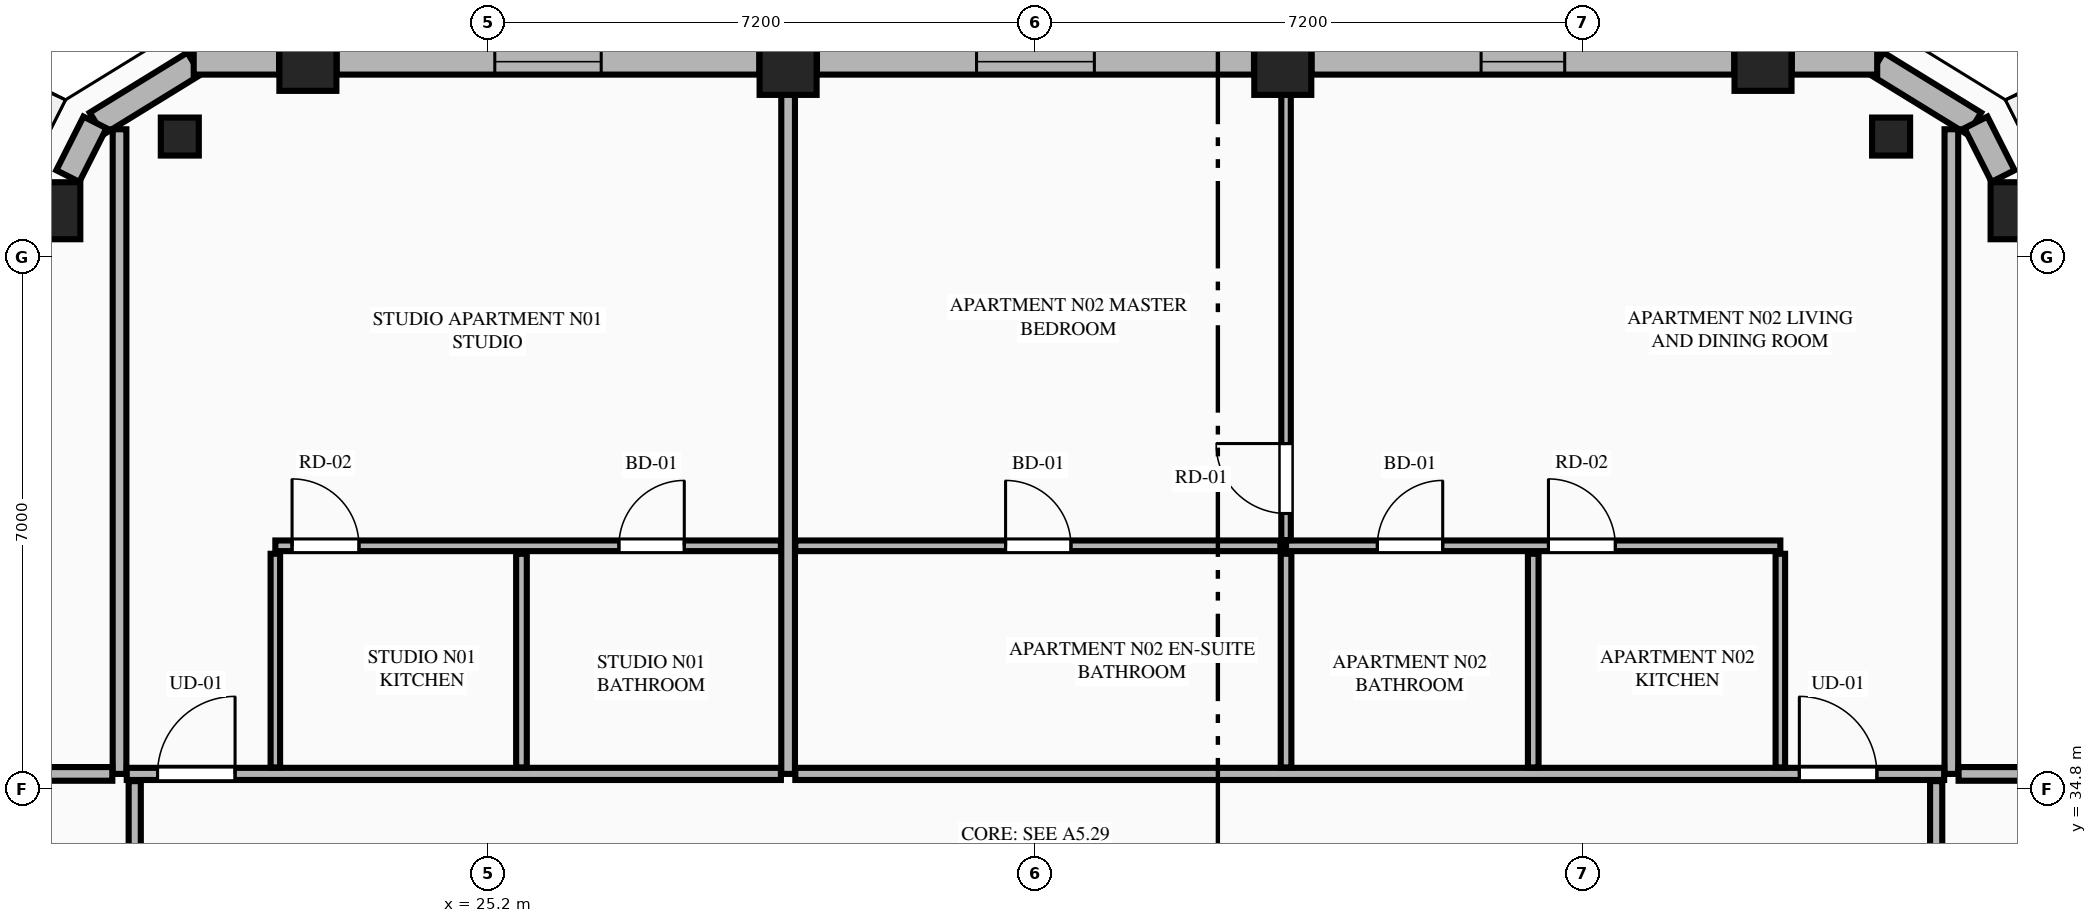
"""IFC4 building model, lengths in metres.
Left out: names, types, materials, properties, quantities, classifications, styles, units other than length and angle.
Written with IfcOpenShell. Run it as: python <this file> out.ifc"""

import sys

from ifc_helpers import new_model, si_unit, direction, frame, frame_2d, origin, origin_2d, place, context, subcontext, project, spatial, rectangle, extrude, element, fill, save


model = new_model("IFC4")
c1 = context("Model", 3, precision=1e-05, world=origin(), true_north=direction((0.0, 1.0)))
c2 = subcontext(c1, "Body", "Model", "MODEL_VIEW")
j1 = project(units=[si_unit("LENGTHUNIT", "METRE"), si_unit("PLANEANGLEUNIT", "RADIAN")], contexts=[c1])
p1 = place(None, origin())
s1 = spatial("IfcSite", under=j1, at=p1, CompositionType="ELEMENT")
p2 = place(p1, origin())
s2 = spatial("IfcBuilding", under=s1, at=p2, CompositionType="ELEMENT")
p3 = place(p2, frame((0.0, 0.0, 237.95)))
s3 = spatial("IfcBuildingStorey", under=s2, at=p3, CompositionType="ELEMENT", Elevation=237.95)
for number, where, z_axis, x_axis in (
    (1, (45.341, 42.409, 0.0), (0.0, 0.0, 1.0), (1.0, 0.0, 0.0)),
    (2, (41.972, 44.361, 0.0), (0.0, 0.0, 1.0), (1.0, 0.0, 0.0)),
    (3, (35.654, 44.308, 0.0), (0.0, 0.0, 1.0), (1.0, 0.0, 0.0)),
    (4, (29.146, 44.308, 0.0), (0.0, 0.0, 1.0), (1.0, 0.0, 0.0)),
    (5, (22.828, 44.361, 0.0), (0.0, 0.0, 1.0), (1.0, 0.0, 0.0)),
    (6, (19.459, 42.409, 0.0), (0.0, 0.0, 1.0), (1.0, 0.0, 0.0)),
):
    element("IfcColumn", number, at=place(p3, frame(where, z_axis=z_axis, x_axis=x_axis)), inside=s3, PredefinedType="COLUMN", context=c2, shape_type="SweptSolid", body=[
        extrude(rectangle(XDim=0.75, YDim=0.75, at=origin_2d()), origin(), (0.0, 0.0, 1.0), 3.65),
    ])
for number, where, z_axis, x_axis in (
    (7, (43.657, 43.385, 0.0), (0.0, 0.0, 1.0), (-0.865, 0.501, 0.0)),
    (8, (21.143, 43.385, 0.0), (0.0, 0.0, 1.0), (-0.865, -0.501, 0.0)),
):
    element("IfcColumn", number, at=place(p3, frame(where, z_axis=z_axis, x_axis=x_axis)), inside=s3, PredefinedType="PILASTER", context=c2, shape_type="SweptSolid", body=[
        extrude(rectangle(XDim=0.5, YDim=0.35, at=origin_2d()), origin(), (0.0, 0.0, 1.0), 3.65),
    ])
for number, where, z_axis, x_axis in (
    (9, (44.753, 43.555, 0.0), (0.0, 0.0, 1.0), (-0.852, 0.524, 0.0)),
    (10, (21.331, 44.345, 0.0), (0.0, 0.0, 1.0), (-0.852, -0.524, 0.0)),
):
    element("IfcWall", number, at=place(p3, frame(where, z_axis=z_axis, x_axis=x_axis)), inside=s3, PredefinedType="STANDARD", context=c2, shape_type="SweptSolid", body=[
        extrude(rectangle(XDim=1.508, YDim=0.34, at=frame_2d((0.754, 0.0))), origin(), (0.0, 0.0, 1.0), 3.45),
    ])
p4 = place(p3, frame((45.13, 42.865, 0.0), z_axis=(0.0, 0.0, 1.0), x_axis=(-0.451159191899, 0.892443490404, 0.0)))
e11 = element("IfcWall", 11, at=p4, inside=s3, PredefinedType="STANDARD", context=c2, shape_type="SweptSolid", body=[
    extrude(rectangle(XDim=0.791, YDim=0.34, at=frame_2d((0.396, 0.0))), origin(), (0.0, 0.0, 1.0), 3.45),
])
p5 = place(p3, frame((43.474, 44.37, 0.0), z_axis=(0.0, 0.0, 1.0), x_axis=(-1.0, 0.0, 0.0)))
e12 = element("IfcWall", 12, at=p5, inside=s3, PredefinedType="STANDARD", context=c2, shape_type="SweptSolid", body=[
    extrude(rectangle(XDim=1.123, YDim=0.34, at=frame_2d((0.562, 0.0))), origin(), (0.0, 0.0, 1.0), 3.45),
])
p6 = place(p3, frame((41.593, 44.37, 0.0), z_axis=(0.0, 0.0, 1.0), x_axis=(-1.0, 0.0, 0.0)))
e13 = element("IfcWall", 13, at=p6, inside=s3, PredefinedType="STANDARD", context=c2, shape_type="SweptSolid", body=[
    extrude(rectangle(XDim=5.56, YDim=0.34, at=frame_2d((2.78, 0.0))), origin(), (0.0, 0.0, 1.0), 2.983),
])
p7 = place(p6, frame((2.23, 0.0, 0.75)))
e14 = element("IfcOpeningElement", 14, at=p7, cuts=e13, PredefinedType="OPENING", context=c2, shape_type="SweptSolid", body=[
    extrude(rectangle(XDim=1.1, YDim=2.0, at=frame_2d((0.55, 1.0))), frame((0.0, 0.18, 0.0), z_axis=(0.0, -1.0, 0.0), x_axis=(1.0, 0.0, 0.0)), (0.0, 0.0, 1.0), 0.36),
])
p8 = place(p3, frame((35.275, 44.37, 0.0), z_axis=(0.0, 0.0, 1.0), x_axis=(-1.0, 0.0, 0.0)))
e15 = element("IfcWall", 15, at=p8, inside=s3, PredefinedType="STANDARD", context=c2, shape_type="SweptSolid", body=[
    extrude(rectangle(XDim=5.75, YDim=0.34, at=frame_2d((2.875, 0.0))), origin(), (0.0, 0.0, 1.0), 2.983),
])
p9 = place(p8, frame((2.1, 0.0, 0.75)))
e16 = element("IfcOpeningElement", 16, at=p9, cuts=e15, PredefinedType="OPENING", context=c2, shape_type="SweptSolid", body=[
    extrude(rectangle(XDim=1.55, YDim=2.05, at=frame_2d((0.775, 1.025))), frame((0.0, 0.18, 0.0), z_axis=(0.0, -1.0, 0.0), x_axis=(1.0, 0.0, 0.0)), (0.0, 0.0, 1.0), 0.36),
])
p10 = place(p3, frame((28.767, 44.37, 0.0), z_axis=(0.0, 0.0, 1.0), x_axis=(-1.0, 0.0, 0.0)))
e17 = element("IfcWall", 17, at=p10, inside=s3, PredefinedType="STANDARD", context=c2, shape_type="SweptSolid", body=[
    extrude(rectangle(XDim=5.56, YDim=0.34, at=frame_2d((2.78, 0.0))), origin(), (0.0, 0.0, 1.0), 2.983),
])
p11 = place(p10, frame((2.08, 0.0, 0.75)))
e18 = element("IfcOpeningElement", 18, at=p11, cuts=e17, PredefinedType="OPENING", context=c2, shape_type="SweptSolid", body=[
    extrude(rectangle(XDim=1.4, YDim=2.05, at=frame_2d((0.7, 1.025))), frame((0.0, 0.18, 0.0), z_axis=(0.0, -1.0, 0.0), x_axis=(1.0, 0.0, 0.0)), (0.0, 0.0, 1.0), 0.36),
])
p12 = place(p3, frame((22.449, 44.37, 0.0), z_axis=(0.0, 0.0, 1.0), x_axis=(-1.0, 0.0, 0.0)))
e19 = element("IfcWall", 19, at=p12, inside=s3, PredefinedType="STANDARD", context=c2, shape_type="SweptSolid", body=[
    extrude(rectangle(XDim=1.123, YDim=0.34, at=frame_2d((0.562, 0.0))), origin(), (0.0, 0.0, 1.0), 3.45),
])
p13 = place(p3, frame((20.027, 43.571, 0.0), z_axis=(0.0, 0.0, 1.0), x_axis=(-0.451404919072, -0.89231922485, 0.0)))
e20 = element("IfcWall", 20, at=p13, inside=s3, PredefinedType="STANDARD", context=c2, shape_type="SweptSolid", body=[
    extrude(rectangle(XDim=0.791, YDim=0.34, at=frame_2d((0.396, 0.0))), origin(), (0.0, 0.0, 1.0), 3.45),
])
p14 = place(p3, frame((20.35, 35.0, 0.0), z_axis=(0.0, 0.0, 1.0), x_axis=(0.0, 1.0, 0.0)))
e21 = element("IfcWall", 21, at=p14, inside=s3, PredefinedType="PARTITIONING", context=c2, shape_type="SweptSolid", body=[
    extrude(rectangle(XDim=8.481, YDim=0.18, at=frame_2d((4.24, 0.0))), origin(), (0.0, 0.0, 1.0), 3.45),
])
p15 = place(p3, frame((29.146, 35.0, 0.0), z_axis=(0.0, 0.0, 1.0), x_axis=(0.0, 1.0, 0.0)))
e22 = element("IfcWall", 22, at=p15, inside=s3, PredefinedType="PARTITIONING", context=c2, shape_type="SweptSolid", body=[
    extrude(rectangle(XDim=9.195, YDim=0.18, at=frame_2d((4.598, 0.0))), origin(), (0.0, 0.0, 1.0), 2.907),
])
p16 = place(p3, frame((44.45, 35.0, 0.0), z_axis=(0.0, 0.0, 1.0), x_axis=(0.0, 1.0, 0.0)))
e23 = element("IfcWall", 23, at=p16, inside=s3, PredefinedType="PARTITIONING", context=c2, shape_type="SweptSolid", body=[
    extrude(rectangle(XDim=8.481, YDim=0.18, at=frame_2d((4.24, 0.0))), origin(), (0.0, 0.0, 1.0), 3.45),
])
p17 = place(p3, frame((20.445, 35.0, 0.0), z_axis=(0.0, 0.0, 1.0), x_axis=(1.0, 0.0, 0.0)))
e24 = element("IfcWall", 24, at=p17, inside=s3, PredefinedType="PARTITIONING", context=c2, shape_type="SweptSolid", body=[
    extrude(rectangle(XDim=8.606, YDim=0.16, at=frame_2d((4.303, 0.0))), origin(), (0.0, 0.0, 1.0), 3.45),
])
p18 = place(p17, frame((0.405, 0.0, 0.0)))
e25 = element("IfcOpeningElement", 25, at=p18, cuts=e24, PredefinedType="OPENING", context=c2, shape_type="SweptSolid", body=[
    extrude(rectangle(XDim=1.02, YDim=2.25, at=frame_2d((0.51, 1.125))), frame((0.0, 0.09, 0.0), z_axis=(0.0, -1.0, 0.0), x_axis=(1.0, 0.0, 0.0)), (0.0, 0.0, 1.0), 0.18),
])
p19 = place(p3, frame((22.4, 35.085, 0.0), z_axis=(0.0, 0.0, 1.0), x_axis=(0.0, 1.0, 0.0)))
e26 = element("IfcWall", 26, at=p19, inside=s3, PredefinedType="PARTITIONING", context=c2, shape_type="SweptSolid", body=[
    extrude(rectangle(XDim=2.811, YDim=0.125, at=frame_2d((1.406, 0.0))), origin(), (0.0, 0.0, 1.0), 3.45),
])
p20 = place(p3, frame((22.4, 38.001, 0.0), z_axis=(0.0, 0.0, 1.0), x_axis=(1.0, 0.0, 0.0)))
e27 = element("IfcWall", 27, at=p20, inside=s3, PredefinedType="PLUMBINGWALL", context=c2, shape_type="SweptSolid", body=[
    extrude(rectangle(XDim=6.651, YDim=0.14, at=frame_2d((3.326, 0.0))), origin(), (0.0, 0.0, 1.0), 3.45),
])
p21 = place(p20, frame((4.52, 0.0, 0.0)))
e28 = element("IfcOpeningElement", 28, at=p21, cuts=e27, PredefinedType="OPENING", context=c2, shape_type="SweptSolid", body=[
    extrude(rectangle(XDim=0.86, YDim=2.1, at=frame_2d((0.43, 1.05))), frame((0.0, 0.08, 0.0), z_axis=(0.0, -1.0, 0.0), x_axis=(1.0, 0.0, 0.0)), (0.0, 0.0, 1.0), 0.16),
])
p22 = place(p20, frame((0.22, 0.0, 0.0)))
e29 = element("IfcOpeningElement", 29, at=p22, cuts=e27, PredefinedType="OPENING", context=c2, shape_type="SweptSolid", body=[
    extrude(rectangle(XDim=0.88, YDim=2.15, at=frame_2d((0.44, 1.075))), frame((0.0, 0.08, 0.0), z_axis=(0.0, -1.0, 0.0), x_axis=(1.0, 0.0, 0.0)), (0.0, 0.0, 1.0), 0.16),
])
p23 = place(p3, frame((25.638, 35.085, 0.0), z_axis=(0.0, 0.0, 1.0), x_axis=(0.0, 1.0, 0.0)))
e30 = element("IfcWall", 30, at=p23, inside=s3, PredefinedType="PLUMBINGWALL", context=c2, shape_type="SweptSolid", body=[
    extrude(rectangle(XDim=2.811, YDim=0.14, at=frame_2d((1.406, 0.0))), origin(), (0.0, 0.0, 1.0), 3.45),
])
p24 = place(p3, frame((29.241, 35.0, 0.0), z_axis=(0.0, 0.0, 1.0), x_axis=(1.0, 0.0, 0.0)))
e31 = element("IfcWall", 31, at=p24, inside=s3, PredefinedType="PARTITIONING", context=c2, shape_type="SweptSolid", body=[
    extrude(rectangle(XDim=15.114, YDim=0.16, at=frame_2d((7.557, 0.0))), origin(), (0.0, 0.0, 1.0), 3.45),
])
p25 = place(p24, frame((13.209, 0.0, 0.0)))
e32 = element("IfcOpeningElement", 32, at=p25, cuts=e31, PredefinedType="OPENING", context=c2, shape_type="SweptSolid", body=[
    extrude(rectangle(XDim=1.02, YDim=2.25, at=frame_2d((0.51, 1.125))), frame((0.0, 0.09, 0.0), z_axis=(0.0, -1.0, 0.0), x_axis=(1.0, 0.0, 0.0)), (0.0, 0.0, 1.0), 0.18),
])
p26 = place(p3, frame((42.2, 35.085, 0.0), z_axis=(0.0, 0.0, 1.0), x_axis=(0.0, 1.0, 0.0)))
e33 = element("IfcWall", 33, at=p26, inside=s3, PredefinedType="PARTITIONING", context=c2, shape_type="SweptSolid", body=[
    extrude(rectangle(XDim=2.811, YDim=0.125, at=frame_2d((1.406, 0.0))), origin(), (0.0, 0.0, 1.0), 3.45),
])
p27 = place(p3, frame((35.697, 38.001, 0.0), z_axis=(0.0, 0.0, 1.0), x_axis=(1.0, 0.0, 0.0)))
e34 = element("IfcWall", 34, at=p27, inside=s3, PredefinedType="PLUMBINGWALL", context=c2, shape_type="SweptSolid", body=[
    extrude(rectangle(XDim=6.503, YDim=0.14, at=frame_2d((3.251, 0.0))), origin(), (0.0, 0.0, 1.0), 3.45),
])
p28 = place(p27, frame((1.201, 0.0, 0.0)))
e35 = element("IfcOpeningElement", 35, at=p28, cuts=e34, PredefinedType="OPENING", context=c2, shape_type="SweptSolid", body=[
    extrude(rectangle(XDim=0.86, YDim=2.1, at=frame_2d((0.43, 1.05))), frame((0.0, 0.08, 0.0), z_axis=(0.0, -1.0, 0.0), x_axis=(1.0, 0.0, 0.0)), (0.0, 0.0, 1.0), 0.16),
])
p29 = place(p27, frame((3.452, 0.0, 0.0)))
e36 = element("IfcOpeningElement", 36, at=p29, cuts=e34, PredefinedType="OPENING", context=c2, shape_type="SweptSolid", body=[
    extrude(rectangle(XDim=0.88, YDim=2.15, at=frame_2d((0.44, 1.075))), frame((0.0, 0.08, 0.0), z_axis=(0.0, -1.0, 0.0), x_axis=(1.0, 0.0, 0.0)), (0.0, 0.0, 1.0), 0.16),
])
p30 = place(p3, frame((29.241, 38.001, 0.0), z_axis=(0.0, 0.0, 1.0), x_axis=(1.0, 0.0, 0.0)))
e37 = element("IfcWall", 37, at=p30, inside=s3, PredefinedType="PLUMBINGWALL", context=c2, shape_type="SweptSolid", body=[
    extrude(rectangle(XDim=6.381, YDim=0.14, at=frame_2d((3.19, 0.0))), origin(), (0.0, 0.0, 1.0), 3.45),
])
p31 = place(p30, frame((2.766, 0.0, 0.0)))
e38 = element("IfcOpeningElement", 38, at=p31, cuts=e37, PredefinedType="OPENING", context=c2, shape_type="SweptSolid", body=[
    extrude(rectangle(XDim=0.86, YDim=2.1, at=frame_2d((0.43, 1.05))), frame((0.0, 0.08, 0.0), z_axis=(0.0, -1.0, 0.0), x_axis=(1.0, 0.0, 0.0)), (0.0, 0.0, 1.0), 0.16),
])
p32 = place(p3, frame((38.949, 35.085, 0.0), z_axis=(0.0, 0.0, 1.0), x_axis=(0.0, 1.0, 0.0)))
e39 = element("IfcWall", 39, at=p32, inside=s3, PredefinedType="PLUMBINGWALL", context=c2, shape_type="SweptSolid", body=[
    extrude(rectangle(XDim=2.811, YDim=0.14, at=frame_2d((1.406, 0.0))), origin(), (0.0, 0.0, 1.0), 3.45),
])
p33 = place(p3, frame((35.697, 35.085, 0.0), z_axis=(0.0, 0.0, 1.0), x_axis=(0.0, 1.0, 0.0)))
e40 = element("IfcWall", 40, at=p33, inside=s3, PredefinedType="PLUMBINGWALL", context=c2, shape_type="SweptSolid", body=[
    extrude(rectangle(XDim=2.811, YDim=0.14, at=frame_2d((1.406, 0.0))), origin(), (0.0, 0.0, 1.0), 2.907),
])
p34 = place(p3, frame((35.697, 38.076, 0.0), z_axis=(0.0, 0.0, 1.0), x_axis=(0.0, 1.0, 0.0)))
e41 = element("IfcWall", 41, at=p34, inside=s3, PredefinedType="PARTITIONING", context=c2, shape_type="SweptSolid", body=[
    extrude(rectangle(XDim=6.209, YDim=0.125, at=frame_2d((3.104, 0.0))), origin(), (0.0, 0.0, 1.0), 2.907),
])
p35 = place(p34, frame((0.35, 0.0, 0.0)))
e42 = element("IfcOpeningElement", 42, at=p35, cuts=e41, PredefinedType="OPENING", context=c2, shape_type="SweptSolid", body=[
    extrude(rectangle(XDim=0.92, YDim=2.15, at=frame_2d((0.46, 1.075))), frame((0.0, 0.073, 0.0), z_axis=(0.0, -1.0, 0.0), x_axis=(1.0, 0.0, 0.0)), (0.0, 0.0, 1.0), 0.145),
])
p36 = place(p3, frame((15.933, 35.0, 0.0), z_axis=(0.0, 0.0, 1.0), x_axis=(1.0, 0.0, 0.0)))
e43 = element("IfcWall", 43, at=p36, inside=s3, PredefinedType="PARTITIONING", context=c2, shape_type="SweptSolid", body=[
    extrude(rectangle(XDim=4.322, YDim=0.18, at=frame_2d((2.161, 0.0))), origin(), (0.0, 0.0, 1.0), 3.45),
])
p37 = place(p3, frame((44.545, 35.0, 0.0), z_axis=(0.0, 0.0, 1.0), x_axis=(1.0, 0.0, 0.0)))
e44 = element("IfcWall", 44, at=p37, inside=s3, PredefinedType="PARTITIONING", context=c2, shape_type="SweptSolid", body=[
    extrude(rectangle(XDim=4.322, YDim=0.18, at=frame_2d((2.161, 0.0))), origin(), (0.0, 0.0, 1.0), 3.45),
])
p38 = place(p3, frame((20.55, 16.495, 0.0), z_axis=(0.0, 0.0, 1.0), x_axis=(0.0, 1.0, 0.0)))
e45 = element("IfcWall", 45, at=p38, inside=s3, PredefinedType="PARTITIONING", context=c2, shape_type="SweptSolid", body=[
    extrude(rectangle(XDim=18.41, YDim=0.16, at=frame_2d((9.205, 0.0))), origin(), (0.0, 0.0, 1.0), 3.137),
])
p39 = place(p38, frame((0.45, 0.0, 0.0)))
e46 = element("IfcOpeningElement", 46, at=p39, cuts=e45, PredefinedType="OPENING", context=c2, shape_type="SweptSolid", body=[
    extrude(rectangle(XDim=1.02, YDim=2.25, at=frame_2d((0.51, 1.125))), frame((0.0, 0.09, 0.0), z_axis=(0.0, -1.0, 0.0), x_axis=(1.0, 0.0, 0.0)), (0.0, 0.0, 1.0), 0.18),
])
p40 = place(p3, frame((44.25, 16.495, 0.0), z_axis=(0.0, 0.0, 1.0), x_axis=(0.0, 1.0, 0.0)))
e47 = element("IfcWall", 47, at=p40, inside=s3, PredefinedType="PARTITIONING", context=c2, shape_type="SweptSolid", body=[
    extrude(rectangle(XDim=18.41, YDim=0.16, at=frame_2d((9.205, 0.0))), origin(), (0.0, 0.0, 1.0), 3.137),
])
p41 = place(p40, frame((0.45, 0.0, 0.0)))
e48 = element("IfcOpeningElement", 48, at=p41, cuts=e47, PredefinedType="OPENING", context=c2, shape_type="SweptSolid", body=[
    extrude(rectangle(XDim=1.02, YDim=2.25, at=frame_2d((0.51, 1.125))), frame((0.0, 0.09, 0.0), z_axis=(0.0, -1.0, 0.0), x_axis=(1.0, 0.0, 0.0)), (0.0, 0.0, 1.0), 0.18),
])
p42 = place(p7, origin())
e49 = element("IfcWindow", 49, at=p42, inside=s3, PartitioningType="SINGLE_PANEL", PredefinedType="WINDOW", context=c2, shape_type="SweptSolid", body=[
    extrude(rectangle(XDim=1.1, YDim=2.0, at=frame_2d((0.55, 1.0))), frame((0.0, 0.03, 0.0), z_axis=(0.0, -1.0, 0.0), x_axis=(1.0, 0.0, 0.0)), (0.0, 0.0, 1.0), 0.06),
])
fill(e14, e49)
p43 = place(p9, origin())
e50 = element("IfcWindow", 50, at=p43, inside=s3, PartitioningType="SINGLE_PANEL", PredefinedType="WINDOW", context=c2, shape_type="SweptSolid", body=[
    extrude(rectangle(XDim=1.55, YDim=2.05, at=frame_2d((0.775, 1.025))), frame((0.0, 0.03, 0.0), z_axis=(0.0, -1.0, 0.0), x_axis=(1.0, 0.0, 0.0)), (0.0, 0.0, 1.0), 0.06),
])
fill(e16, e50)
p44 = place(p11, origin())
e51 = element("IfcWindow", 51, at=p44, inside=s3, PartitioningType="SINGLE_PANEL", PredefinedType="WINDOW", context=c2, shape_type="SweptSolid", body=[
    extrude(rectangle(XDim=1.4, YDim=2.05, at=frame_2d((0.7, 1.025))), frame((0.0, 0.03, 0.0), z_axis=(0.0, -1.0, 0.0), x_axis=(1.0, 0.0, 0.0)), (0.0, 0.0, 1.0), 0.06),
])
fill(e18, e51)
p45 = place(p21, origin())
e52 = element("IfcDoor", 52, at=p45, inside=s3, OperationType="SINGLE_SWING_RIGHT", PredefinedType="DOOR", context=c2, shape_type="SweptSolid", body=[
    extrude(rectangle(XDim=0.86, YDim=2.1, at=frame_2d((0.43, 1.05))), frame((0.0, 0.025, 0.0), z_axis=(0.0, -1.0, 0.0), x_axis=(1.0, 0.0, 0.0)), (0.0, 0.0, 1.0), 0.05),
])
fill(e28, e52)
p46 = place(p18, origin())
e53 = element("IfcDoor", 53, at=p46, inside=s3, OperationType="SINGLE_SWING_RIGHT", PredefinedType="DOOR", context=c2, shape_type="SweptSolid", body=[
    extrude(rectangle(XDim=1.02, YDim=2.25, at=frame_2d((0.51, 1.125))), frame((0.0, 0.025, 0.0), z_axis=(0.0, -1.0, 0.0), x_axis=(1.0, 0.0, 0.0)), (0.0, 0.0, 1.0), 0.05),
])
fill(e25, e53)
p47 = place(p22, origin())
e54 = element("IfcDoor", 54, at=p47, inside=s3, OperationType="SINGLE_SWING_LEFT", PredefinedType="DOOR", context=c2, shape_type="SweptSolid", body=[
    extrude(rectangle(XDim=0.88, YDim=2.15, at=frame_2d((0.44, 1.075))), frame((0.0, 0.025, 0.0), z_axis=(0.0, -1.0, 0.0), x_axis=(1.0, 0.0, 0.0)), (0.0, 0.0, 1.0), 0.05),
])
fill(e29, e54)
p48 = place(p28, origin())
e55 = element("IfcDoor", 55, at=p48, inside=s3, OperationType="SINGLE_SWING_RIGHT", PredefinedType="DOOR", context=c2, shape_type="SweptSolid", body=[
    extrude(rectangle(XDim=0.86, YDim=2.1, at=frame_2d((0.43, 1.05))), frame((0.0, 0.025, 0.0), z_axis=(0.0, -1.0, 0.0), x_axis=(1.0, 0.0, 0.0)), (0.0, 0.0, 1.0), 0.05),
])
fill(e35, e55)
p49 = place(p31, origin())
e56 = element("IfcDoor", 56, at=p49, inside=s3, OperationType="SINGLE_SWING_LEFT", PredefinedType="DOOR", context=c2, shape_type="SweptSolid", body=[
    extrude(rectangle(XDim=0.86, YDim=2.1, at=frame_2d((0.43, 1.05))), frame((0.0, 0.025, 0.0), z_axis=(0.0, -1.0, 0.0), x_axis=(1.0, 0.0, 0.0)), (0.0, 0.0, 1.0), 0.05),
])
fill(e38, e56)
p50 = place(p25, origin())
e57 = element("IfcDoor", 57, at=p50, inside=s3, OperationType="SINGLE_SWING_LEFT", PredefinedType="DOOR", context=c2, shape_type="SweptSolid", body=[
    extrude(rectangle(XDim=1.02, YDim=2.25, at=frame_2d((0.51, 1.125))), frame((0.0, 0.025, 0.0), z_axis=(0.0, -1.0, 0.0), x_axis=(1.0, 0.0, 0.0)), (0.0, 0.0, 1.0), 0.05),
])
fill(e32, e57)
p51 = place(p29, origin())
e58 = element("IfcDoor", 58, at=p51, inside=s3, OperationType="SINGLE_SWING_LEFT", PredefinedType="DOOR", context=c2, shape_type="SweptSolid", body=[
    extrude(rectangle(XDim=0.88, YDim=2.15, at=frame_2d((0.44, 1.075))), frame((0.0, 0.025, 0.0), z_axis=(0.0, -1.0, 0.0), x_axis=(1.0, 0.0, 0.0)), (0.0, 0.0, 1.0), 0.05),
])
fill(e36, e58)
p52 = place(p35, origin())
e59 = element("IfcDoor", 59, at=p52, inside=s3, OperationType="SINGLE_SWING_RIGHT", PredefinedType="DOOR", context=c2, shape_type="SweptSolid", body=[
    extrude(rectangle(XDim=0.92, YDim=2.15, at=frame_2d((0.46, 1.075))), frame((0.0, 0.025, 0.0), z_axis=(0.0, -1.0, 0.0), x_axis=(1.0, 0.0, 0.0)), (0.0, 0.0, 1.0), 0.05),
])
fill(e42, e59)
save(model, sys.argv[1])
